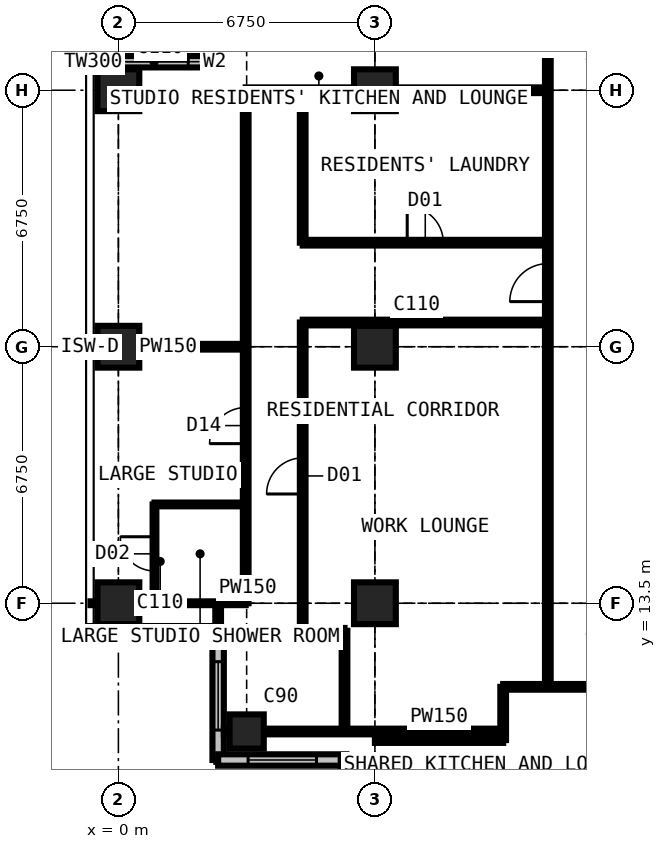
"""IFC4 building model, lengths in metres.
Left out: names, types, materials, properties, quantities, classifications, styles, units other than length and angle.
Written with IfcOpenShell. Run it as: python <this file> out.ifc"""

import sys

from ifc_helpers import new_model, si_unit, direction, frame, frame_2d, origin, origin_2d, place, context, subcontext, project, spatial, rectangle, extrude, element, fill, save


model = new_model("IFC4")
c1 = context("Model", 3, precision=1e-05, world=origin(), true_north=direction((0.0, 1.0)))
c2 = subcontext(c1, "Body", "Model", "MODEL_VIEW")
j1 = project(units=[si_unit("LENGTHUNIT", "METRE"), si_unit("PLANEANGLEUNIT", "RADIAN")], contexts=[c1])
p1 = place(None, origin())
s1 = spatial("IfcSite", under=j1, at=p1, CompositionType="ELEMENT")
p2 = place(p1, origin())
s2 = spatial("IfcBuilding", under=s1, at=p2, CompositionType="ELEMENT")
p3 = place(p2, frame((0.0, 0.0, 215.1)))
s3 = spatial("IfcBuildingStorey", under=s2, at=p3, CompositionType="ELEMENT", Elevation=215.1)
for number, where, z_axis, x_axis in (
    (1, (0.0, 13.5, 0.0), (0.0, 0.0, 1.0), (1.0, 0.0, 0.0)),
    (2, (0.0, 20.25, 0.0), (0.0, 0.0, 1.0), (1.0, 0.0, 0.0)),
    (3, (0.0, 27.0, 0.0), (0.0, 0.0, 1.0), (1.0, 0.0, 0.0)),
):
    element("IfcColumn", number, at=place(p3, frame(where, z_axis=z_axis, x_axis=x_axis)), inside=s3, PredefinedType="COLUMN", context=c2, shape_type="SweptSolid", body=[
        extrude(rectangle(XDim=1.1, YDim=1.1, at=origin_2d()), origin(), (0.0, 0.0, 1.0), 3.6),
    ])
p4 = place(p3, frame((3.375, 10.125, 0.0), z_axis=(0.0, 0.0, 1.0), x_axis=(1.0, 0.0, 0.0)))
e4 = element("IfcColumn", 4, at=p4, inside=s3, PredefinedType="COLUMN", context=c2, shape_type="SweptSolid", body=[
    extrude(rectangle(XDim=0.9, YDim=0.9, at=origin_2d()), origin(), (0.0, 0.0, 1.0), 3.6),
])
for number, where, z_axis, x_axis in (
    (5, (6.75, 13.5, 0.0), (0.0, 0.0, 1.0), (1.0, 0.0, 0.0)),
    (6, (6.75, 20.25, 0.0), (0.0, 0.0, 1.0), (1.0, 0.0, 0.0)),
    (7, (6.75, 27.0, 0.0), (0.0, 0.0, 1.0), (1.0, 0.0, 0.0)),
):
    element("IfcColumn", number, at=place(p3, frame(where, z_axis=z_axis, x_axis=x_axis)), inside=s3, PredefinedType="COLUMN", context=c2, shape_type="SweptSolid", body=[
        extrude(rectangle(XDim=1.1, YDim=1.1, at=origin_2d()), origin(), (0.0, 0.0, 1.0), 3.6),
    ])
p5 = place(p3, frame((2.625, 31.125, 0.0), z_axis=(0.0, 0.0, 1.0), x_axis=(0.0, -1.0, 0.0)))
e8 = element("IfcWall", 8, at=p5, inside=s3, PredefinedType="SOLIDWALL", context=c2, shape_type="SweptSolid", body=[
    extrude(rectangle(XDim=3.375, YDim=0.3, at=frame_2d((1.688, 0.0))), origin(), (0.0, 0.0, 1.0), 3.375),
])
p6 = place(p5, frame((0.788, 0.0, 0.6)))
e9 = element("IfcOpeningElement", 9, at=p6, cuts=e8, PredefinedType="OPENING", context=c2, shape_type="SweptSolid", body=[
    extrude(rectangle(XDim=1.8, YDim=2.1, at=frame_2d((0.9, 1.05))), frame((0.0, 0.16, 0.0), z_axis=(0.0, -1.0, 0.0), x_axis=(1.0, 0.0, 0.0)), (0.0, 0.0, 1.0), 0.32),
])
p7 = place(p3, frame((2.625, 27.75, 0.0), z_axis=(0.0, 0.0, 1.0), x_axis=(-1.0, 0.0, 0.0)))
e10 = element("IfcWall", 10, at=p7, inside=s3, PredefinedType="SOLIDWALL", context=c2, shape_type="SweptSolid", body=[
    extrude(rectangle(XDim=3.375, YDim=0.3, at=frame_2d((1.688, 0.0))), origin(), (0.0, 0.0, 1.0), 3.375),
])
p8 = place(p7, frame((0.788, 0.0, 0.6)))
e11 = element("IfcOpeningElement", 11, at=p8, cuts=e10, PredefinedType="OPENING", context=c2, shape_type="SweptSolid", body=[
    extrude(rectangle(XDim=1.8, YDim=2.1, at=frame_2d((0.9, 1.05))), frame((0.0, 0.16, 0.0), z_axis=(0.0, -1.0, 0.0), x_axis=(1.0, 0.0, 0.0)), (0.0, 0.0, 1.0), 0.32),
])
p9 = place(p3, frame((-0.75, 12.75, 0.0), z_axis=(0.0, 0.0, 1.0), x_axis=(1.0, 0.0, 0.0)))
e12 = element("IfcWall", 12, at=p9, inside=s3, PredefinedType="SOLIDWALL", context=c2, shape_type="SweptSolid", body=[
    extrude(rectangle(XDim=3.375, YDim=0.3, at=frame_2d((1.688, 0.0))), origin(), (0.0, 0.0, 1.0), 3.375),
])
p10 = place(p9, frame((0.788, 0.0, 0.6)))
e13 = element("IfcOpeningElement", 13, at=p10, cuts=e12, PredefinedType="OPENING", context=c2, shape_type="SweptSolid", body=[
    extrude(rectangle(XDim=1.8, YDim=2.1, at=frame_2d((0.9, 1.05))), frame((0.0, 0.16, 0.0), z_axis=(0.0, -1.0, 0.0), x_axis=(1.0, 0.0, 0.0)), (0.0, 0.0, 1.0), 0.32),
])
p11 = place(p3, frame((2.625, 12.75, 0.0), z_axis=(0.0, 0.0, 1.0), x_axis=(0.0, -1.0, 0.0)))
e14 = element("IfcWall", 14, at=p11, inside=s3, PredefinedType="SOLIDWALL", context=c2, shape_type="SweptSolid", body=[
    extrude(rectangle(XDim=3.375, YDim=0.3, at=frame_2d((1.688, 0.0))), origin(), (0.0, 0.0, 1.0), 3.375),
])
p12 = place(p11, frame((0.788, 0.0, 0.6)))
e15 = element("IfcOpeningElement", 15, at=p12, cuts=e14, PredefinedType="OPENING", context=c2, shape_type="SweptSolid", body=[
    extrude(rectangle(XDim=1.8, YDim=2.1, at=frame_2d((0.9, 1.05))), frame((0.0, 0.16, 0.0), z_axis=(0.0, -1.0, 0.0), x_axis=(1.0, 0.0, 0.0)), (0.0, 0.0, 1.0), 0.32),
])
p13 = place(p3, frame((2.625, 9.375, 0.0), z_axis=(0.0, 0.0, 1.0), x_axis=(1.0, 0.0, 0.0)))
e16 = element("IfcWall", 16, at=p13, inside=s3, PredefinedType="SOLIDWALL", context=c2, shape_type="SweptSolid", body=[
    extrude(rectangle(XDim=3.375, YDim=0.3, at=frame_2d((1.688, 0.0))), origin(), (0.0, 0.0, 1.0), 3.375),
])
p14 = place(p13, frame((0.788, 0.0, 0.6)))
e17 = element("IfcOpeningElement", 17, at=p14, cuts=e16, PredefinedType="OPENING", context=c2, shape_type="SweptSolid", body=[
    extrude(rectangle(XDim=1.8, YDim=2.1, at=frame_2d((0.9, 1.05))), frame((0.0, 0.16, 0.0), z_axis=(0.0, -1.0, 0.0), x_axis=(1.0, 0.0, 0.0)), (0.0, 0.0, 1.0), 0.32),
])
p15 = place(p3, frame((6.0, 9.375, 0.0), z_axis=(0.0, 0.0, 1.0), x_axis=(0.0, -1.0, 0.0)))
e18 = element("IfcWall", 18, at=p15, inside=s3, PredefinedType="SOLIDWALL", context=c2, shape_type="SweptSolid", body=[
    extrude(rectangle(XDim=3.375, YDim=0.3, at=frame_2d((1.688, 0.0))), origin(), (0.0, 0.0, 1.0), 3.375),
])
p16 = place(p15, frame((0.788, 0.0, 0.6)))
e19 = element("IfcOpeningElement", 19, at=p16, cuts=e18, PredefinedType="OPENING", context=c2, shape_type="SweptSolid", body=[
    extrude(rectangle(XDim=1.8, YDim=2.1, at=frame_2d((0.9, 1.05))), frame((0.0, 0.16, 0.0), z_axis=(0.0, -1.0, 0.0), x_axis=(1.0, 0.0, 0.0)), (0.0, 0.0, 1.0), 0.32),
])
p17 = place(p3, frame((-0.734, 13.5, 0.0), z_axis=(0.0, 0.0, 1.0), x_axis=(1.0, 0.0, 0.0)))
e20 = element("IfcWall", 20, at=p17, inside=s3, PredefinedType="PARTITIONING", context=c2, shape_type="SweptSolid", body=[
    extrude(rectangle(XDim=4.084, YDim=0.1, at=frame_2d((2.042, 0.0))), origin(), (0.0, 0.0, 1.0), 2.877),
])
p18 = place(p3, frame((-0.734, 20.25, 0.0), z_axis=(0.0, 0.0, 1.0), x_axis=(1.0, 0.0, 0.0)))
e21 = element("IfcWall", 21, at=p18, inside=s3, PredefinedType="PARTITIONING", context=c2, shape_type="SweptSolid", body=[
    extrude(rectangle(XDim=4.084, YDim=0.15, at=frame_2d((2.042, 0.0))), origin(), (0.0, 0.0, 1.0), 2.877),
])
p19 = place(p3, frame((0.95, 13.5, 0.0), z_axis=(0.0, 0.0, 1.0), x_axis=(0.0, 1.0, 0.0)))
e22 = element("IfcWall", 22, at=p19, inside=s3, PredefinedType="PARTITIONING", context=c2, shape_type="SweptSolid", body=[
    extrude(rectangle(XDim=2.6, YDim=0.1, at=frame_2d((1.3, 0.0))), origin(), (0.0, 0.0, 1.0), 3.375),
])
p20 = place(p19, frame((0.85, 0.0, 0.0)))
e23 = element("IfcOpeningElement", 23, at=p20, cuts=e22, PredefinedType="OPENING", context=c2, shape_type="SweptSolid", body=[
    extrude(rectangle(XDim=0.9, YDim=2.2, at=frame_2d((0.45, 1.1))), frame((0.0, 0.06, 0.0), z_axis=(0.0, -1.0, 0.0), x_axis=(1.0, 0.0, 0.0)), (0.0, 0.0, 1.0), 0.12),
])
p21 = place(p3, frame((0.95, 16.1, 0.0), z_axis=(0.0, 0.0, 1.0), x_axis=(1.0, 0.0, 0.0)))
e24 = element("IfcWall", 24, at=p21, inside=s3, PredefinedType="PARTITIONING", context=c2, shape_type="SweptSolid", body=[
    extrude(rectangle(XDim=2.4, YDim=0.1, at=frame_2d((1.2, 0.0))), origin(), (0.0, 0.0, 1.0), 3.375),
])
p22 = place(p3, frame((2.625, 12.766, 0.0), z_axis=(0.0, 0.0, 1.0), x_axis=(0.0, 1.0, 0.0)))
e25 = element("IfcWall", 25, at=p22, inside=s3, PredefinedType="PARTITIONING", context=c2, shape_type="SweptSolid", body=[
    extrude(rectangle(XDim=0.734, YDim=0.15, at=frame_2d((0.367, 0.0))), origin(), (0.0, 0.0, 1.0), 3.375),
])
p23 = place(p3, frame((2.775, 10.125, 0.0), z_axis=(0.0, 0.0, 1.0), x_axis=(1.0, 0.0, 0.0)))
e26 = element("IfcWall", 26, at=p23, inside=s3, PredefinedType="PARTITIONING", context=c2, shape_type="SweptSolid", body=[
    extrude(rectangle(XDim=7.35, YDim=0.15, at=frame_2d((3.675, 0.0))), origin(), (0.0, 0.0, 1.0), 2.877),
])
p24 = place(p3, frame((3.35, 13.5, 0.0), z_axis=(0.0, 0.0, 1.0), x_axis=(0.0, 1.0, 0.0)))
e27 = element("IfcWall", 27, at=p24, inside=s3, PredefinedType="PARTITIONING", context=c2, shape_type="SweptSolid", body=[
    extrude(rectangle(XDim=13.5, YDim=0.15, at=frame_2d((6.75, 0.0))), origin(), (0.0, 0.0, 1.0), 3.375),
])
p25 = place(p24, frame((4.2, 0.0, 0.0)))
e28 = element("IfcOpeningElement", 28, at=p25, cuts=e27, PredefinedType="OPENING", context=c2, shape_type="SweptSolid", body=[
    extrude(rectangle(XDim=0.95, YDim=2.2, at=frame_2d((0.475, 1.1))), frame((0.0, 0.085, 0.0), z_axis=(0.0, -1.0, 0.0), x_axis=(1.0, 0.0, 0.0)), (0.0, 0.0, 1.0), 0.17),
])
p26 = place(p3, frame((3.35, 27.0, 0.0), z_axis=(0.0, 0.0, 1.0), x_axis=(1.0, 0.0, 0.0)))
e29 = element("IfcWall", 29, at=p26, inside=s3, PredefinedType="PARTITIONING", context=c2, shape_type="SweptSolid", body=[
    extrude(rectangle(XDim=7.95, YDim=0.15, at=frame_2d((3.975, 0.0))), origin(), (0.0, 0.0, 1.0), 2.877),
])
p27 = place(p3, frame((4.85, 12.775, 0.0), z_axis=(0.0, 0.0, 1.0), x_axis=(0.0, 1.0, 0.0)))
e30 = element("IfcWall", 30, at=p27, inside=s3, PredefinedType="PARTITIONING", context=c2, shape_type="SweptSolid", body=[
    extrude(rectangle(XDim=8.113, YDim=0.15, at=frame_2d((4.056, 0.0))), origin(), (0.0, 0.0, 1.0), 3.375),
])
p28 = place(p27, frame((3.6, 0.0, 0.0)))
e31 = element("IfcOpeningElement", 31, at=p28, cuts=e30, PredefinedType="OPENING", context=c2, shape_type="SweptSolid", body=[
    extrude(rectangle(XDim=0.95, YDim=2.2, at=frame_2d((0.475, 1.1))), frame((0.0, 0.085, 0.0), z_axis=(0.0, -1.0, 0.0), x_axis=(1.0, 0.0, 0.0)), (0.0, 0.0, 1.0), 0.17),
])
p29 = place(p3, frame((4.85, 12.775, 0.0), z_axis=(0.0, 0.0, 1.0), x_axis=(1.0, 0.0, 0.0)))
e32 = element("IfcWall", 32, at=p29, inside=s3, PredefinedType="PARTITIONING", context=c2, shape_type="SweptSolid", body=[
    extrude(rectangle(XDim=1.1, YDim=0.15, at=frame_2d((0.55, 0.0))), origin(), (0.0, 0.0, 1.0), 3.375),
])
p30 = place(p3, frame((4.85, 20.887, 0.0), z_axis=(0.0, 0.0, 1.0), x_axis=(1.0, 0.0, 0.0)))
e33 = element("IfcWall", 33, at=p30, inside=s3, PredefinedType="PARTITIONING", context=c2, shape_type="SweptSolid", body=[
    extrude(rectangle(XDim=6.45, YDim=0.15, at=frame_2d((3.225, 0.0))), origin(), (0.0, 0.0, 1.0), 3.375),
])
p31 = place(p3, frame((4.85, 22.988, 0.0), z_axis=(0.0, 0.0, 1.0), x_axis=(0.0, 1.0, 0.0)))
e34 = element("IfcWall", 34, at=p31, inside=s3, PredefinedType="PARTITIONING", context=c2, shape_type="SweptSolid", body=[
    extrude(rectangle(XDim=4.012, YDim=0.15, at=frame_2d((2.006, 0.0))), origin(), (0.0, 0.0, 1.0), 3.375),
])
p32 = place(p3, frame((4.85, 22.988, 0.0), z_axis=(0.0, 0.0, 1.0), x_axis=(1.0, 0.0, 0.0)))
e35 = element("IfcWall", 35, at=p32, inside=s3, PredefinedType="PARTITIONING", context=c2, shape_type="SweptSolid", body=[
    extrude(rectangle(XDim=6.45, YDim=0.15, at=frame_2d((3.225, 0.0))), origin(), (0.0, 0.0, 1.0), 3.375),
])
p33 = place(p32, frame((2.75, 0.0, 0.0)))
e36 = element("IfcOpeningElement", 36, at=p33, cuts=e35, PredefinedType="OPENING", context=c2, shape_type="SweptSolid", body=[
    extrude(rectangle(XDim=0.95, YDim=2.2, at=frame_2d((0.475, 1.1))), frame((0.0, 0.085, 0.0), z_axis=(0.0, -1.0, 0.0), x_axis=(1.0, 0.0, 0.0)), (0.0, 0.0, 1.0), 0.17),
])
p34 = place(p3, frame((5.95, 10.125, 0.0), z_axis=(0.0, 0.0, 1.0), x_axis=(0.0, 1.0, 0.0)))
e37 = element("IfcWall", 37, at=p34, inside=s3, PredefinedType="PARTITIONING", context=c2, shape_type="SweptSolid", body=[
    extrude(rectangle(XDim=2.65, YDim=0.15, at=frame_2d((1.325, 0.0))), origin(), (0.0, 0.0, 1.0), 3.375),
])
p35 = place(p3, frame((6.75, 9.9, 0.0), z_axis=(0.0, 0.0, 1.0), x_axis=(1.0, 0.0, 0.0)))
e38 = element("IfcWall", 38, at=p35, inside=s3, PredefinedType="PARTITIONING", context=c2, shape_type="SweptSolid", body=[
    extrude(rectangle(XDim=3.375, YDim=0.15, at=frame_2d((1.688, 0.0))), origin(), (0.0, 0.0, 1.0), 3.375),
])
p36 = place(p3, frame((10.125, 9.9, 0.0), z_axis=(0.0, 0.0, 1.0), x_axis=(0.0, 1.0, 0.0)))
e39 = element("IfcWall", 39, at=p36, inside=s3, PredefinedType="PARTITIONING", context=c2, shape_type="SweptSolid", body=[
    extrude(rectangle(XDim=1.4, YDim=0.15, at=frame_2d((0.7, 0.0))), origin(), (0.0, 0.0, 1.0), 3.375),
])
p37 = place(p3, frame((10.125, 11.3, 0.0), z_axis=(0.0, 0.0, 1.0), x_axis=(1.0, 0.0, 0.0)))
e40 = element("IfcWall", 40, at=p37, inside=s3, PredefinedType="PARTITIONING", context=c2, shape_type="SweptSolid", body=[
    extrude(rectangle(XDim=3.375, YDim=0.15, at=frame_2d((1.688, 0.0))), origin(), (0.0, 0.0, 1.0), 3.375),
])
p38 = place(p3, frame((11.3, 11.3, 0.0), z_axis=(0.0, 0.0, 1.0), x_axis=(0.0, 1.0, 0.0)))
e41 = element("IfcWall", 41, at=p38, inside=s3, PredefinedType="PARTITIONING", context=c2, shape_type="SweptSolid", body=[
    extrude(rectangle(XDim=19.3, YDim=0.15, at=frame_2d((9.65, 0.0))), origin(), (0.0, 0.0, 1.0), 3.375),
])
p39 = place(p38, frame((18.1, 0.0, 0.0)))
e42 = element("IfcOpeningElement", 42, at=p39, cuts=e41, PredefinedType="OPENING", context=c2, shape_type="SweptSolid", body=[
    extrude(rectangle(XDim=1.0, YDim=2.2, at=frame_2d((0.5, 1.1))), frame((0.0, 0.085, 0.0), z_axis=(0.0, -1.0, 0.0), x_axis=(1.0, 0.0, 0.0)), (0.0, 0.0, 1.0), 0.17),
])
p40 = place(p38, frame((10.137, 0.0, 0.0)))
e43 = element("IfcOpeningElement", 43, at=p40, cuts=e41, PredefinedType="OPENING", context=c2, shape_type="SweptSolid", body=[
    extrude(rectangle(XDim=1.0, YDim=2.2, at=frame_2d((0.5, 1.1))), frame((0.0, 0.085, 0.0), z_axis=(0.0, -1.0, 0.0), x_axis=(1.0, 0.0, 0.0)), (0.0, 0.0, 1.0), 0.17),
])
p41 = place(p8, origin())
e44 = element("IfcWindow", 44, at=p41, inside=s3, PartitioningType="SINGLE_PANEL", PredefinedType="WINDOW", context=c2, shape_type="SweptSolid", body=[
    extrude(rectangle(XDim=1.8, YDim=2.1, at=frame_2d((0.9, 1.05))), frame((0.0, 0.03, 0.0), z_axis=(0.0, -1.0, 0.0), x_axis=(1.0, 0.0, 0.0)), (0.0, 0.0, 1.0), 0.06),
])
fill(e11, e44)
p42 = place(p10, origin())
e45 = element("IfcWindow", 45, at=p42, inside=s3, PartitioningType="SINGLE_PANEL", PredefinedType="WINDOW", context=c2, shape_type="SweptSolid", body=[
    extrude(rectangle(XDim=1.8, YDim=2.1, at=frame_2d((0.9, 1.05))), frame((0.0, 0.03, 0.0), z_axis=(0.0, -1.0, 0.0), x_axis=(1.0, 0.0, 0.0)), (0.0, 0.0, 1.0), 0.06),
])
fill(e13, e45)
p43 = place(p12, origin())
e46 = element("IfcWindow", 46, at=p43, inside=s3, PartitioningType="SINGLE_PANEL", PredefinedType="WINDOW", context=c2, shape_type="SweptSolid", body=[
    extrude(rectangle(XDim=1.8, YDim=2.1, at=frame_2d((0.9, 1.05))), frame((0.0, 0.03, 0.0), z_axis=(0.0, -1.0, 0.0), x_axis=(1.0, 0.0, 0.0)), (0.0, 0.0, 1.0), 0.06),
])
fill(e15, e46)
p44 = place(p14, origin())
e47 = element("IfcWindow", 47, at=p44, inside=s3, PartitioningType="SINGLE_PANEL", PredefinedType="WINDOW", context=c2, shape_type="SweptSolid", body=[
    extrude(rectangle(XDim=1.8, YDim=2.1, at=frame_2d((0.9, 1.05))), frame((0.0, 0.03, 0.0), z_axis=(0.0, -1.0, 0.0), x_axis=(1.0, 0.0, 0.0)), (0.0, 0.0, 1.0), 0.06),
])
fill(e17, e47)
p45 = place(p25, origin())
e48 = element("IfcDoor", 48, at=p45, inside=s3, OperationType="SINGLE_SWING_LEFT", PredefinedType="DOOR", context=c2, shape_type="SweptSolid", body=[
    extrude(rectangle(XDim=0.95, YDim=2.2, at=frame_2d((0.475, 1.1))), frame((0.0, 0.025, 0.0), z_axis=(0.0, -1.0, 0.0), x_axis=(1.0, 0.0, 0.0)), (0.0, 0.0, 1.0), 0.05),
])
fill(e28, e48)
p46 = place(p20, origin())
e49 = element("IfcDoor", 49, at=p46, inside=s3, OperationType="SINGLE_SWING_RIGHT", PredefinedType="DOOR", context=c2, shape_type="SweptSolid", body=[
    extrude(rectangle(XDim=0.9, YDim=2.2, at=frame_2d((0.45, 1.1))), frame((0.0, 0.025, 0.0), z_axis=(0.0, -1.0, 0.0), x_axis=(1.0, 0.0, 0.0)), (0.0, 0.0, 1.0), 0.05),
])
fill(e23, e49)
p47 = place(p40, origin())
e50 = element("IfcDoor", 50, at=p47, inside=s3, OperationType="SINGLE_SWING_LEFT", PredefinedType="DOOR", context=c2, shape_type="SweptSolid", body=[
    extrude(rectangle(XDim=1.0, YDim=2.2, at=frame_2d((0.5, 1.1))), frame((0.0, 0.025, 0.0), z_axis=(0.0, -1.0, 0.0), x_axis=(1.0, 0.0, 0.0)), (0.0, 0.0, 1.0), 0.05),
])
fill(e43, e50)
p48 = place(p33, origin())
e51 = element("IfcDoor", 51, at=p48, inside=s3, OperationType="SINGLE_SWING_LEFT", PredefinedType="DOOR", context=c2, shape_type="SweptSolid", body=[
    extrude(rectangle(XDim=0.95, YDim=2.2, at=frame_2d((0.475, 1.1))), frame((0.0, 0.025, 0.0), z_axis=(0.0, -1.0, 0.0), x_axis=(1.0, 0.0, 0.0)), (0.0, 0.0, 1.0), 0.05),
])
fill(e36, e51)
p49 = place(p28, origin())
e52 = element("IfcDoor", 52, at=p49, inside=s3, OperationType="SINGLE_SWING_LEFT", PredefinedType="DOOR", context=c2, shape_type="SweptSolid", body=[
    extrude(rectangle(XDim=0.95, YDim=2.2, at=frame_2d((0.475, 1.1))), frame((0.0, 0.025, 0.0), z_axis=(0.0, -1.0, 0.0), x_axis=(1.0, 0.0, 0.0)), (0.0, 0.0, 1.0), 0.05),
])
fill(e31, e52)
save(model, sys.argv[1])
